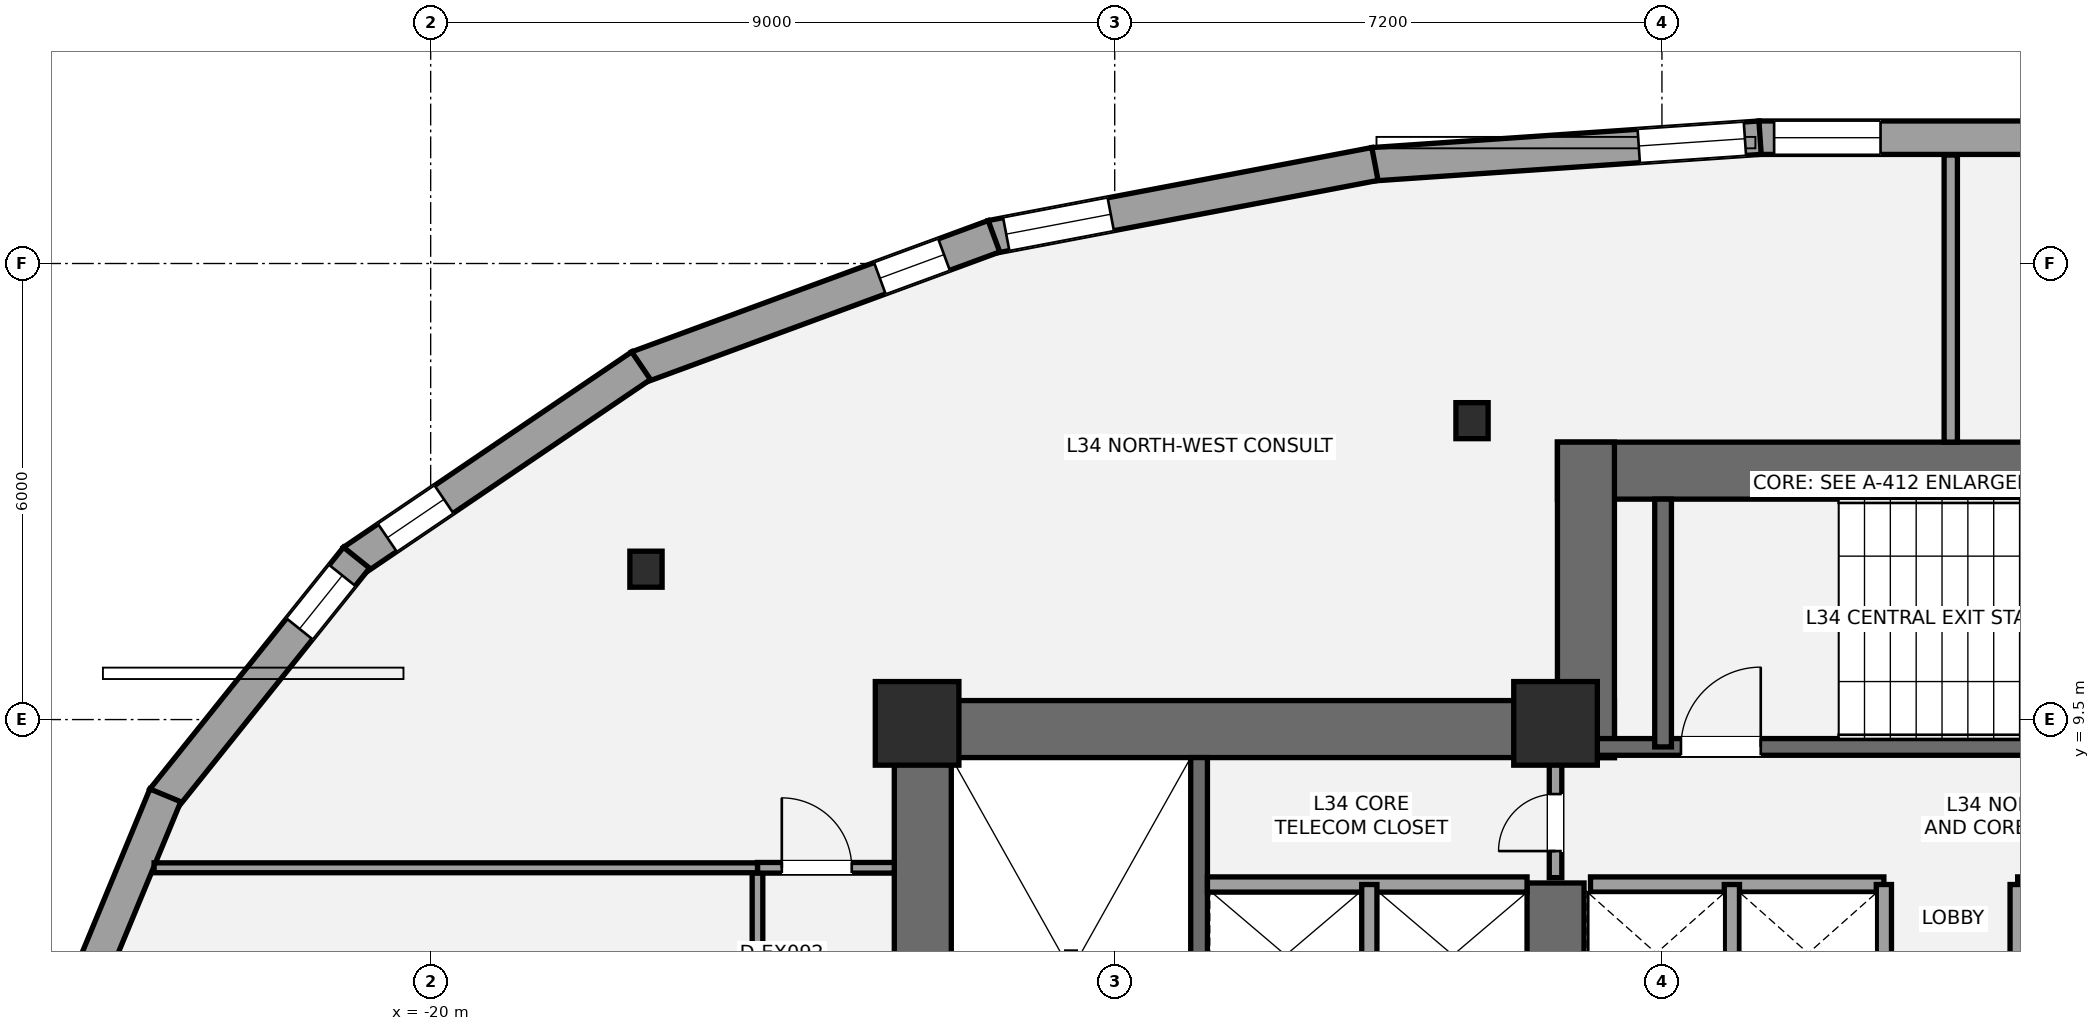
"""IFC4 building model, lengths in metres.
Left out: names, types, materials, properties, quantities, classifications, styles, units other than length and angle.
Written with IfcOpenShell. Run it as: python <this file> out.ifc"""

import sys

from ifc_helpers import new_model, si_unit, direction, frame, frame_2d, origin, origin_2d, place, context, subcontext, project, spatial, rectangle, i_section, extrude, element, fill, save


model = new_model("IFC4")
c1 = context("Model", 3, precision=1e-05, world=origin(), true_north=direction((0.0, 1.0)))
c2 = subcontext(c1, "Body", "Model", "MODEL_VIEW")
j1 = project(units=[si_unit("LENGTHUNIT", "METRE"), si_unit("PLANEANGLEUNIT", "RADIAN")], contexts=[c1])
p1 = place(None, origin())
s1 = spatial("IfcSite", under=j1, at=p1, CompositionType="ELEMENT")
p2 = place(p1, origin())
s2 = spatial("IfcBuilding", under=s1, at=p2, CompositionType="ELEMENT")
p3 = place(p2, frame((0.0, 0.0, 128.1)))
s3 = spatial("IfcBuildingStorey", under=s2, at=p3, CompositionType="ELEMENT", Elevation=128.1)
p4 = place(p3, frame((-13.525, 1.1, 0.0), z_axis=(0.0, 0.0, 1.0), x_axis=(0.0, 1.0, 0.0)))
e1 = element("IfcWall", 1, at=p4, inside=s3, PredefinedType="SHEAR", context=c2, shape_type="SweptSolid", body=[
    extrude(rectangle(XDim=8.65, YDim=0.75, at=frame_2d((4.325, 0.0))), origin(), (0.0, 0.0, 1.0), 3.5),
])
p5 = place(p3, frame((-13.9, 9.375, 0.0), z_axis=(0.0, 0.0, 1.0), x_axis=(1.0, 0.0, 0.0)))
e2 = element("IfcWall", 2, at=p5, inside=s3, PredefinedType="SHEAR", context=c2, shape_type="SweptSolid", body=[
    extrude(rectangle(XDim=9.475, YDim=0.75, at=frame_2d((4.737, 0.0))), origin(), (0.0, 0.0, 1.0), 3.5),
])
p6 = place(p3, frame((-5.2, 5.35, 0.0), z_axis=(0.0, 0.0, 1.0), x_axis=(0.0, 1.0, 0.0)))
e3 = element("IfcWall", 3, at=p6, inside=s3, PredefinedType="SHEAR", context=c2, shape_type="SweptSolid", body=[
    extrude(rectangle(XDim=2.0, YDim=0.75, at=frame_2d((1.0, 0.0))), origin(), (0.0, 0.0, 1.0), 3.5),
])
p7 = place(p3, frame((-9.89, 1.85, 0.0), z_axis=(0.0, 0.0, 1.0), x_axis=(0.0, 1.0, 0.0)))
e4 = element("IfcWall", 4, at=p7, inside=s3, PredefinedType="SHEAR", context=c2, shape_type="SweptSolid", body=[
    extrude(rectangle(XDim=7.15, YDim=0.22, at=frame_2d((3.575, 0.0))), origin(), (0.0, 0.0, 1.0), 3.5),
])
p8 = place(p3, frame((-5.175, 12.775, 0.0), z_axis=(0.0, 0.0, 1.0), x_axis=(1.0, 0.0, 0.0)))
e5 = element("IfcWall", 5, at=p8, inside=s3, PredefinedType="SHEAR", context=c2, shape_type="SweptSolid", body=[
    extrude(rectangle(XDim=10.35, YDim=0.75, at=frame_2d((5.175, 0.0))), origin(), (0.0, 0.0, 1.0), 3.5),
])
p9 = place(p3, frame((-4.8, 9.0, 0.0), z_axis=(0.0, 0.0, 1.0), x_axis=(0.0, 1.0, 0.0)))
e6 = element("IfcWall", 6, at=p9, inside=s3, PredefinedType="SHEAR", context=c2, shape_type="SweptSolid", body=[
    extrude(rectangle(XDim=4.15, YDim=0.75, at=frame_2d((2.075, 0.0))), origin(), (0.0, 0.0, 1.0), 3.5),
])
p10 = place(p3, frame((-4.7, 9.14, 0.0), z_axis=(0.0, 0.0, 1.0), x_axis=(1.0, 0.0, 0.0)))
e7 = element("IfcWall", 7, at=p10, inside=s3, PredefinedType="SHEAR", context=c2, shape_type="SweptSolid", body=[
    extrude(rectangle(XDim=9.3, YDim=0.22, at=frame_2d((4.65, 0.0))), origin(), (0.0, 0.0, 1.0), 3.5),
])
p11 = place(p10, frame((1.15, 0.0, 0.0)))
e8 = element("IfcOpeningElement", 8, at=p11, cuts=e7, PredefinedType="OPENING", context=c2, shape_type="SweptSolid", body=[
    extrude(rectangle(XDim=1.05, YDim=2.15, at=frame_2d((0.525, 1.075))), frame((0.0, 0.12, 0.0), z_axis=(0.0, -1.0, 0.0), x_axis=(1.0, 0.0, 0.0)), (0.0, 0.0, 1.0), 0.24),
])
p12 = place(p3, frame((-3.785, 9.14, 0.0), z_axis=(0.0, 0.0, 1.0), x_axis=(0.0, 1.0, 0.0)))
e9 = element("IfcWall", 9, at=p12, inside=s3, PredefinedType="SHEAR", context=c2, shape_type="SweptSolid", body=[
    extrude(rectangle(XDim=3.26, YDim=0.22, at=frame_2d((1.63, 0.0))), origin(), (0.0, 0.0, 1.0), 3.5),
])
for number, where, z_axis, x_axis in (
    (10, (-13.6, 9.45, 0.0), (0.0, 0.0, 1.0), (1.0, 0.0, 0.0)),
    (11, (-5.2, 9.45, 0.0), (0.0, 0.0, 1.0), (1.0, 0.0, 0.0)),
):
    element("IfcColumn", number, at=place(p3, frame(where, z_axis=z_axis, x_axis=x_axis)), inside=s3, PredefinedType="COLUMN", context=c2, shape_type="SweptSolid", body=[
        extrude(rectangle(XDim=1.1, YDim=1.1, at=origin_2d()), origin(), (0.0, 0.0, 1.0), 3.5),
    ])
for number, where, z_axis, x_axis in (
    (12, (-6.299, 13.433, 0.0), (0.0, 0.0, 1.0), (1.0, 0.0, 0.0)),
    (13, (-17.167, 11.478, 0.0), (0.0, 0.0, 1.0), (1.0, 0.0, 0.0)),
):
    element("IfcColumn", number, at=place(p3, frame(where, z_axis=z_axis, x_axis=x_axis)), inside=s3, PredefinedType="COLUMN", context=c2, shape_type="SweptSolid", body=[
        extrude(i_section(OverallWidth=0.424, OverallDepth=0.474, WebThickness=0.048, FlangeThickness=0.077, at=origin_2d()), origin(), (0.0, 0.0, 1.0), 3.5),
    ])
p13 = place(p3, frame((-2.524, 17.155, 0.0), z_axis=(0.0, 0.0, 1.0), x_axis=(1.0, 0.0, 0.0)))
e14 = element("IfcWall", 14, at=p13, inside=s3, PredefinedType="STANDARD", context=c2, shape_type="SweptSolid", body=[
    extrude(rectangle(XDim=5.048, YDim=0.44, at=frame_2d((2.524, 0.0))), origin(), (0.0, 0.0, 1.0), 2.528),
])
p14 = place(p13, frame((0.2, 0.0, 0.45)))
e15 = element("IfcOpeningElement", 15, at=p14, cuts=e14, PredefinedType="OPENING", context=c2, shape_type="SweptSolid", body=[
    extrude(rectangle(XDim=1.4, YDim=1.55, at=frame_2d((0.7, 0.775))), frame((0.0, 0.23, 0.0), z_axis=(0.0, -1.0, 0.0), x_axis=(1.0, 0.0, 0.0)), (0.0, 0.0, 1.0), 0.46),
])
p15 = place(p3, frame((-7.602, 16.806, 0.0), z_axis=(0.0, 0.0, 1.0), x_axis=(0.997652685464, 0.068477143536, 0.0)))
e16 = element("IfcWall", 16, at=p15, inside=s3, PredefinedType="STANDARD", context=c2, shape_type="SweptSolid", body=[
    extrude(rectangle(XDim=5.105, YDim=0.44, at=frame_2d((2.553, 0.0))), origin(), (0.0, 0.0, 1.0), 2.528),
])
p16 = place(p15, frame((3.505, 0.0, 0.45)))
e17 = element("IfcOpeningElement", 17, at=p16, cuts=e16, PredefinedType="OPENING", context=c2, shape_type="SweptSolid", body=[
    extrude(rectangle(XDim=1.4, YDim=1.55, at=frame_2d((0.7, 0.775))), frame((0.0, 0.23, 0.0), z_axis=(0.0, -1.0, 0.0), x_axis=(1.0, 0.0, 0.0)), (0.0, 0.0, 1.0), 0.46),
])
p17 = place(p3, frame((-12.624, 15.849, 0.0), z_axis=(0.0, 0.0, 1.0), x_axis=(0.982383038938, 0.186878476041, 0.0)))
e18 = element("IfcWall", 18, at=p17, inside=s3, PredefinedType="STANDARD", context=c2, shape_type="SweptSolid", body=[
    extrude(rectangle(XDim=5.138, YDim=0.44, at=frame_2d((2.569, 0.0))), origin(), (0.0, 0.0, 1.0), 2.528),
])
p18 = place(p17, frame((0.2, 0.0, 0.58)))
e19 = element("IfcOpeningElement", 19, at=p18, cuts=e18, PredefinedType="OPENING", context=c2, shape_type="SweptSolid", body=[
    extrude(rectangle(XDim=1.4, YDim=1.55, at=frame_2d((0.7, 0.775))), frame((0.0, 0.23, 0.0), z_axis=(0.0, -1.0, 0.0), x_axis=(1.0, 0.0, 0.0)), (0.0, 0.0, 1.0), 0.46),
])
p19 = place(p3, frame((-17.279, 14.132, 0.0), z_axis=(0.0, 0.0, 1.0), x_axis=(0.938408147313, 0.345528796278, 0.0)))
e20 = element("IfcWall", 20, at=p19, inside=s3, PredefinedType="STANDARD", context=c2, shape_type="SweptSolid", body=[
    extrude(rectangle(XDim=4.998, YDim=0.44, at=frame_2d((2.499, 0.0))), origin(), (0.0, 0.0, 1.0), 2.528),
])
p20 = place(p19, frame((3.398, 0.0, 0.58)))
e21 = element("IfcOpeningElement", 21, at=p20, cuts=e20, PredefinedType="OPENING", context=c2, shape_type="SweptSolid", body=[
    extrude(rectangle(XDim=0.9, YDim=1.35, at=frame_2d((0.45, 0.675))), frame((0.0, 0.23, 0.0), z_axis=(0.0, -1.0, 0.0), x_axis=(1.0, 0.0, 0.0)), (0.0, 0.0, 1.0), 0.46),
])
p21 = place(p3, frame((-21.024, 11.585, 0.0), z_axis=(0.0, 0.0, 1.0), x_axis=(0.827687941294, 0.561188624116, 0.0)))
e22 = element("IfcWall", 22, at=p21, inside=s3, PredefinedType="STANDARD", context=c2, shape_type="SweptSolid", body=[
    extrude(rectangle(XDim=4.582, YDim=0.44, at=frame_2d((2.291, 0.0))), origin(), (0.0, 0.0, 1.0), 2.528),
])
p22 = place(p21, frame((0.548, 0.0, 0.58)))
e23 = element("IfcOpeningElement", 23, at=p22, cuts=e22, PredefinedType="OPENING", context=c2, shape_type="SweptSolid", body=[
    extrude(rectangle(XDim=0.9, YDim=1.35, at=frame_2d((0.45, 0.675))), frame((0.0, 0.23, 0.0), z_axis=(0.0, -1.0, 0.0), x_axis=(1.0, 0.0, 0.0)), (0.0, 0.0, 1.0), 0.46),
])
p23 = place(p3, frame((-23.523, 8.449, 0.0), z_axis=(0.0, 0.0, 1.0), x_axis=(0.625169926256, 0.780488669556, 0.0)))
e24 = element("IfcWall", 24, at=p23, inside=s3, PredefinedType="STANDARD", context=c2, shape_type="SweptSolid", body=[
    extrude(rectangle(XDim=4.074, YDim=0.44, at=frame_2d((2.037, 0.0))), origin(), (0.0, 0.0, 1.0), 2.528),
])
p24 = place(p23, frame((2.875, 0.0, 0.58)))
e25 = element("IfcOpeningElement", 25, at=p24, cuts=e24, PredefinedType="OPENING", context=c2, shape_type="SweptSolid", body=[
    extrude(rectangle(XDim=0.9, YDim=1.35, at=frame_2d((0.45, 0.675))), frame((0.0, 0.23, 0.0), z_axis=(0.0, -1.0, 0.0), x_axis=(1.0, 0.0, 0.0)), (0.0, 0.0, 1.0), 0.46),
])
p25 = place(p3, frame((-24.908, 5.081, 0.0), z_axis=(0.0, 0.0, 1.0), x_axis=(0.382433297136, 0.923983102249, 0.0)))
e26 = element("IfcWall", 26, at=p25, inside=s3, PredefinedType="STANDARD", context=c2, shape_type="SweptSolid", body=[
    extrude(rectangle(XDim=3.704, YDim=0.44, at=frame_2d((1.852, 0.0))), origin(), (0.0, 0.0, 1.0), 2.528),
])
p26 = place(p25, frame((0.249, 0.0, 0.42)))
e27 = element("IfcOpeningElement", 27, at=p26, cuts=e26, PredefinedType="OPENING", context=c2, shape_type="SweptSolid", body=[
    extrude(rectangle(XDim=0.9, YDim=1.35, at=frame_2d((0.45, 0.675))), frame((0.0, 0.23, 0.0), z_axis=(0.0, -1.0, 0.0), x_axis=(1.0, 0.0, 0.0)), (0.0, 0.0, 1.0), 0.46),
])
p27 = place(p3, frame((-9.78, 7.33, 0.0), z_axis=(0.0, 0.0, 1.0), x_axis=(1.0, 0.0, 0.0)))
e28 = element("IfcWall", 28, at=p27, inside=s3, PredefinedType="SOLIDWALL", context=c2, shape_type="SweptSolid", body=[
    extrude(rectangle(XDim=4.205, YDim=0.2, at=frame_2d((2.103, 0.0))), origin(), (0.0, 0.0, 1.0), 3.31),
])
p28 = place(p3, frame((-7.65, 5.47, 0.0), z_axis=(0.0, 0.0, 1.0), x_axis=(0.0, 1.0, 0.0)))
e29 = element("IfcWall", 29, at=p28, inside=s3, PredefinedType="SOLIDWALL", context=c2, shape_type="SweptSolid", body=[
    extrude(rectangle(XDim=1.86, YDim=0.2, at=frame_2d((0.93, 0.0))), origin(), (0.0, 0.0, 1.0), 3.31),
])
for number, where, z_axis, x_axis in (
    (30, (-4.74, 7.33, 0.0), (0.0, 0.0, 1.0), (1.0, 0.0, 0.0)),
    (31, (0.88, 7.33, 0.0), (0.0, 0.0, 1.0), (1.0, 0.0, 0.0)),
):
    element("IfcWall", number, at=place(p3, frame(where, z_axis=z_axis, x_axis=x_axis)), inside=s3, PredefinedType="SOLIDWALL", context=c2, shape_type="SweptSolid", body=[
        extrude(rectangle(XDim=3.86, YDim=0.2, at=frame_2d((1.93, 0.0))), origin(), (0.0, 0.0, 1.0), 3.31),
    ])
for number, where, z_axis, x_axis in (
    (32, (-2.88, 5.52, 0.0), (0.0, 0.0, 1.0), (0.0, 1.0, 0.0)),
    (33, (-0.88, 5.52, 0.0), (0.0, 0.0, 1.0), (0.0, 1.0, 0.0)),
    (34, (0.88, 5.52, 0.0), (0.0, 0.0, 1.0), (0.0, 1.0, 0.0)),
):
    element("IfcWall", number, at=place(p3, frame(where, z_axis=z_axis, x_axis=x_axis)), inside=s3, PredefinedType="SOLIDWALL", context=c2, shape_type="SweptSolid", body=[
        extrude(rectangle(XDim=1.81, YDim=0.2, at=frame_2d((0.905, 0.0))), origin(), (0.0, 0.0, 1.0), 3.31),
    ])
p29 = place(p3, frame((-5.2, 7.42, 0.0), z_axis=(0.0, 0.0, 1.0), x_axis=(0.0, 1.0, 0.0)))
e35 = element("IfcWall", 35, at=p29, inside=s3, PredefinedType="PARTITIONING", context=c2, shape_type="SweptSolid", body=[
    extrude(rectangle(XDim=1.58, YDim=0.165, at=frame_2d((0.79, 0.0))), origin(), (0.0, 0.0, 1.0), 3.31),
])
p30 = place(p29, frame((0.35, 0.0, 0.0)))
e36 = element("IfcOpeningElement", 36, at=p30, cuts=e35, PredefinedType="OPENING", context=c2, shape_type="SweptSolid", body=[
    extrude(rectangle(XDim=0.75, YDim=2.1, at=frame_2d((0.375, 1.05))), frame((0.0, 0.093, 0.0), z_axis=(0.0, -1.0, 0.0), x_axis=(1.0, 0.0, 0.0)), (0.0, 0.0, 1.0), 0.185),
])
p31 = place(p3, frame((-15.7, -14.47, 0.0), z_axis=(0.0, 0.0, 1.0), x_axis=(0.0, 1.0, 0.0)))
e37 = element("IfcWall", 37, at=p31, inside=s3, PredefinedType="PARTITIONING", context=c2, shape_type="SweptSolid", body=[
    extrude(rectangle(XDim=22.02, YDim=0.14, at=frame_2d((11.01, 0.0))), origin(), (0.0, 0.0, 1.0), 2.763),
])
p32 = place(p31, frame((9.32, 0.0, 0.0)))
e38 = element("IfcOpeningElement", 38, at=p32, cuts=e37, PredefinedType="OPENING", context=c2, shape_type="SweptSolid", body=[
    extrude(rectangle(XDim=0.9, YDim=2.1, at=frame_2d((0.45, 1.05))), frame((0.0, 0.08, 0.0), z_axis=(0.0, -1.0, 0.0), x_axis=(1.0, 0.0, 0.0)), (0.0, 0.0, 1.0), 0.16),
])
p33 = place(p31, frame((14.42, 0.0, 0.0)))
e39 = element("IfcOpeningElement", 39, at=p33, cuts=e37, PredefinedType="OPENING", context=c2, shape_type="SweptSolid", body=[
    extrude(rectangle(XDim=0.9, YDim=2.1, at=frame_2d((0.45, 1.05))), frame((0.0, 0.08, 0.0), z_axis=(0.0, -1.0, 0.0), x_axis=(1.0, 0.0, 0.0)), (0.0, 0.0, 1.0), 0.16),
])
p34 = place(p31, frame((19.095, 0.0, 0.0)))
e40 = element("IfcOpeningElement", 40, at=p34, cuts=e37, PredefinedType="OPENING", context=c2, shape_type="SweptSolid", body=[
    extrude(rectangle(XDim=0.9, YDim=2.1, at=frame_2d((0.45, 1.05))), frame((0.0, 0.08, 0.0), z_axis=(0.0, -1.0, 0.0), x_axis=(1.0, 0.0, 0.0)), (0.0, 0.0, 1.0), 0.16),
])
p35 = place(p3, frame((-15.7, 7.55, 0.0), z_axis=(0.0, 0.0, 1.0), x_axis=(1.0, 0.0, 0.0)))
e41 = element("IfcWall", 41, at=p35, inside=s3, PredefinedType="PARTITIONING", context=c2, shape_type="SweptSolid", body=[
    extrude(rectangle(XDim=1.8, YDim=0.14, at=frame_2d((0.9, 0.0))), origin(), (0.0, 0.0, 1.0), 2.763),
])
p36 = place(p35, frame((0.32, 0.0, 0.0)))
e42 = element("IfcOpeningElement", 42, at=p36, cuts=e41, PredefinedType="OPENING", context=c2, shape_type="SweptSolid", body=[
    extrude(rectangle(XDim=0.92, YDim=2.15, at=frame_2d((0.46, 1.075))), frame((0.0, 0.08, 0.0), z_axis=(0.0, -1.0, 0.0), x_axis=(1.0, 0.0, 0.0)), (0.0, 0.0, 1.0), 0.16),
])
p37 = place(p3, frame((0.0, 13.15, 0.0), z_axis=(0.0, 0.0, 1.0), x_axis=(0.0, 1.0, 0.0)))
e43 = element("IfcWall", 43, at=p37, inside=s3, PredefinedType="PARTITIONING", context=c2, shape_type="SweptSolid", body=[
    extrude(rectangle(XDim=3.777, YDim=0.175, at=frame_2d((1.889, 0.0))), origin(), (0.0, 0.0, 1.0), 3.31),
])
p38 = place(p3, frame((-23.639, 7.55, 0.0), z_axis=(0.0, 0.0, 1.0), x_axis=(1.0, 0.0, 0.0)))
e44 = element("IfcWall", 44, at=p38, inside=s3, PredefinedType="PARTITIONING", context=c2, shape_type="SweptSolid", body=[
    extrude(rectangle(XDim=7.939, YDim=0.13, at=frame_2d((3.969, 0.0))), origin(), (0.0, 0.0, 1.0), 2.763),
])
p39 = place(p14, origin())
e45 = element("IfcWindow", 45, at=p39, inside=s3, PartitioningType="SINGLE_PANEL", PredefinedType="WINDOW", context=c2, shape_type="SweptSolid", body=[
    extrude(rectangle(XDim=1.4, YDim=1.55, at=frame_2d((0.7, 0.775))), frame((0.0, -0.01, 0.0), z_axis=(0.0, -1.0, 0.0), x_axis=(1.0, 0.0, 0.0)), (0.0, 0.0, 1.0), 0.06),
])
fill(e15, e45)
p40 = place(p16, origin())
e46 = element("IfcWindow", 46, at=p40, inside=s3, PartitioningType="SINGLE_PANEL", PredefinedType="WINDOW", context=c2, shape_type="SweptSolid", body=[
    extrude(rectangle(XDim=1.4, YDim=1.55, at=frame_2d((0.7, 0.775))), frame((0.0, -0.01, 0.0), z_axis=(0.0, -1.0, 0.0), x_axis=(1.0, 0.0, 0.0)), (0.0, 0.0, 1.0), 0.06),
])
fill(e17, e46)
p41 = place(p18, origin())
e47 = element("IfcWindow", 47, at=p41, inside=s3, PartitioningType="SINGLE_PANEL", PredefinedType="WINDOW", context=c2, shape_type="SweptSolid", body=[
    extrude(rectangle(XDim=1.4, YDim=1.55, at=frame_2d((0.7, 0.775))), frame((0.0, -0.01, 0.0), z_axis=(0.0, -1.0, 0.0), x_axis=(1.0, 0.0, 0.0)), (0.0, 0.0, 1.0), 0.06),
])
fill(e19, e47)
p42 = place(p20, origin())
e48 = element("IfcWindow", 48, at=p42, inside=s3, PartitioningType="SINGLE_PANEL", PredefinedType="WINDOW", context=c2, shape_type="SweptSolid", body=[
    extrude(rectangle(XDim=0.9, YDim=1.35, at=frame_2d((0.45, 0.675))), frame((0.0, -0.01, 0.0), z_axis=(0.0, -1.0, 0.0), x_axis=(1.0, 0.0, 0.0)), (0.0, 0.0, 1.0), 0.06),
])
fill(e21, e48)
p43 = place(p22, origin())
e49 = element("IfcWindow", 49, at=p43, inside=s3, PartitioningType="SINGLE_PANEL", PredefinedType="WINDOW", context=c2, shape_type="SweptSolid", body=[
    extrude(rectangle(XDim=0.9, YDim=1.35, at=frame_2d((0.45, 0.675))), frame((0.0, -0.01, 0.0), z_axis=(0.0, -1.0, 0.0), x_axis=(1.0, 0.0, 0.0)), (0.0, 0.0, 1.0), 0.06),
])
fill(e23, e49)
p44 = place(p24, origin())
e50 = element("IfcWindow", 50, at=p44, inside=s3, PartitioningType="SINGLE_PANEL", PredefinedType="WINDOW", context=c2, shape_type="SweptSolid", body=[
    extrude(rectangle(XDim=0.9, YDim=1.35, at=frame_2d((0.45, 0.675))), frame((0.0, -0.01, 0.0), z_axis=(0.0, -1.0, 0.0), x_axis=(1.0, 0.0, 0.0)), (0.0, 0.0, 1.0), 0.06),
])
fill(e25, e50)
p45 = place(p11, origin())
e51 = element("IfcDoor", 51, at=p45, inside=s3, OperationType="SINGLE_SWING_RIGHT", PredefinedType="DOOR", context=c2, shape_type="SweptSolid", body=[
    extrude(rectangle(XDim=1.05, YDim=2.15, at=frame_2d((0.525, 1.075))), frame((0.0, 0.025, 0.0), z_axis=(0.0, -1.0, 0.0), x_axis=(1.0, 0.0, 0.0)), (0.0, 0.0, 1.0), 0.05),
])
fill(e8, e51)
p46 = place(p30, origin())
e52 = element("IfcDoor", 52, at=p46, inside=s3, OperationType="SINGLE_SWING_LEFT", PredefinedType="DOOR", context=c2, shape_type="SweptSolid", body=[
    extrude(rectangle(XDim=0.75, YDim=2.1, at=frame_2d((0.375, 1.05))), frame((0.0, 0.025, 0.0), z_axis=(0.0, -1.0, 0.0), x_axis=(1.0, 0.0, 0.0)), (0.0, 0.0, 1.0), 0.05),
])
fill(e36, e52)
p47 = place(p36, origin())
e53 = element("IfcDoor", 53, at=p47, inside=s3, OperationType="SINGLE_SWING_LEFT", PredefinedType="DOOR", context=c2, shape_type="SweptSolid", body=[
    extrude(rectangle(XDim=0.92, YDim=2.15, at=frame_2d((0.46, 1.075))), frame((0.0, 0.025, 0.0), z_axis=(0.0, -1.0, 0.0), x_axis=(1.0, 0.0, 0.0)), (0.0, 0.0, 1.0), 0.05),
])
fill(e42, e53)
save(model, sys.argv[1])
